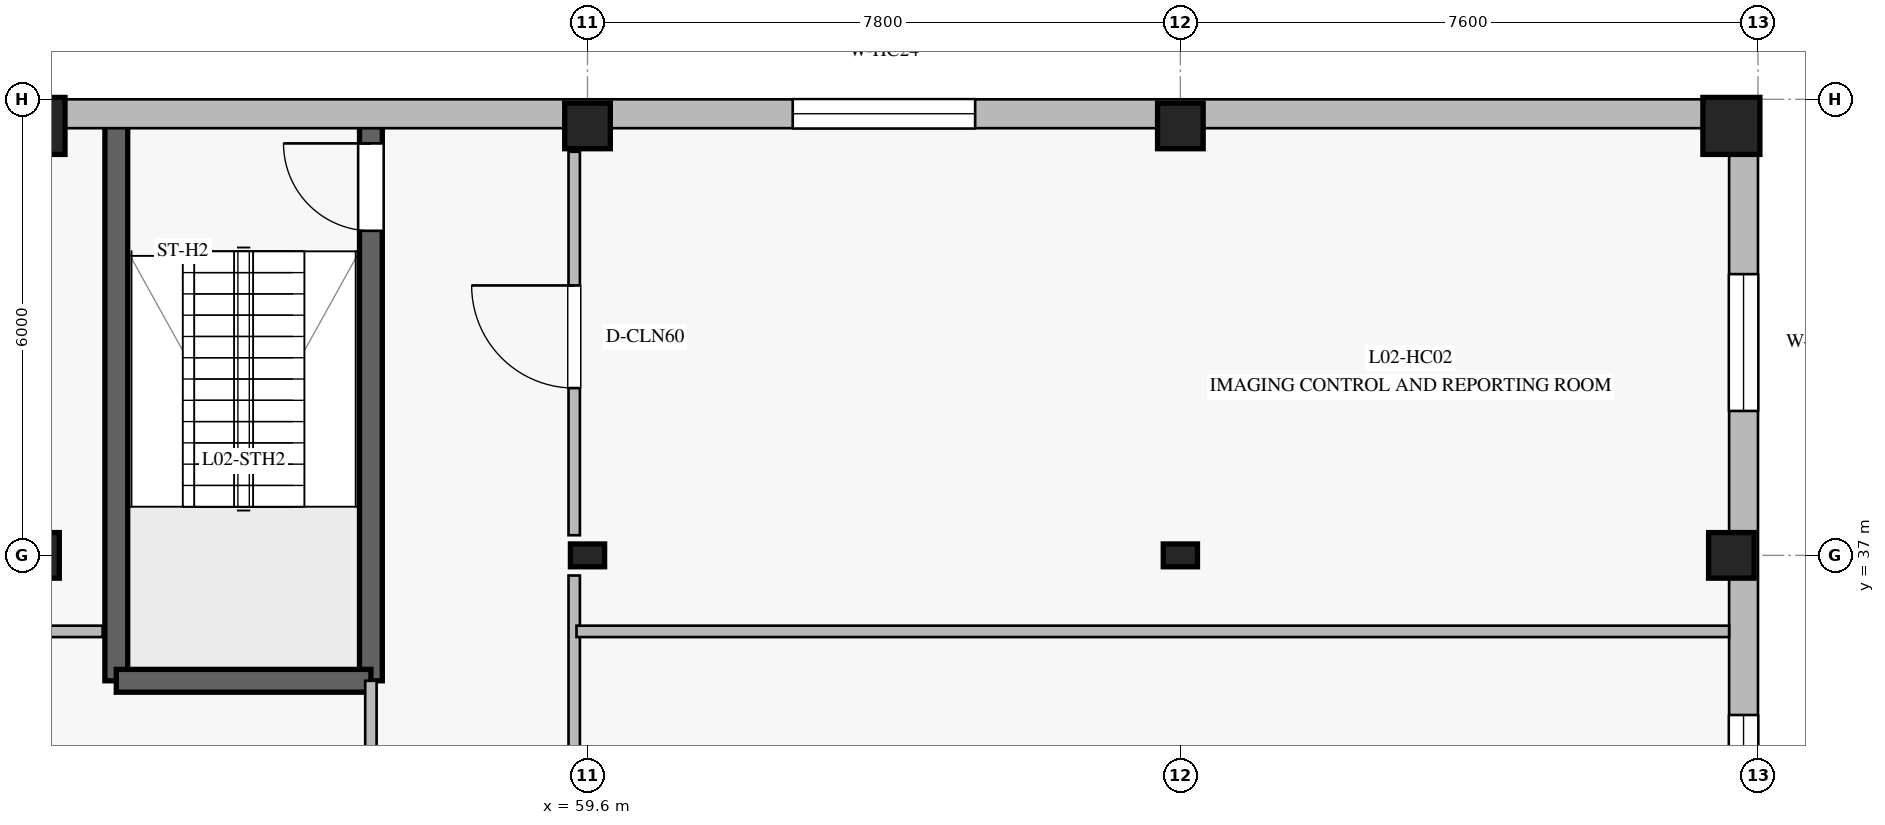
"""IFC4 building model, lengths in metres.
Left out: names, types, materials, properties, quantities, classifications, styles, units other than length and angle.
Written with IfcOpenShell. Run it as: python <this file> out.ifc"""

import sys

from ifc_helpers import new_model, si_unit, direction, frame, frame_2d, origin, origin_2d, place, context, subcontext, project, spatial, rectangle, i_section, extrude, element, fill, save


model = new_model("IFC4")
c1 = context("Model", 3, precision=1e-05, world=origin(), true_north=direction((0.0, 1.0)))
c2 = subcontext(c1, "Body", "Model", "MODEL_VIEW")
j1 = project(units=[si_unit("LENGTHUNIT", "METRE"), si_unit("PLANEANGLEUNIT", "RADIAN")], contexts=[c1])
p1 = place(None, origin())
s1 = spatial("IfcSite", under=j1, at=p1, CompositionType="ELEMENT")
p2 = place(p1, origin())
s2 = spatial("IfcBuilding", under=s1, at=p2, CompositionType="ELEMENT")
p3 = place(p2, frame((0.0, 0.0, 9.8)))
s3 = spatial("IfcBuildingStorey", under=s2, at=p3, CompositionType="ELEMENT", Elevation=9.8)
p4 = place(p3, frame((56.75, 35.35, 0.0), z_axis=(0.0, 0.0, 1.0), x_axis=(0.0, 1.0, 0.0)))
e1 = element("IfcWall", 1, at=p4, inside=s3, PredefinedType="SOLIDWALL", context=c2, shape_type="SweptSolid", body=[
    extrude(rectangle(XDim=7.3, YDim=0.3, at=frame_2d((3.65, 0.0))), origin(), (0.0, 0.0, 1.0), 4.34),
])
p5 = place(p4, frame((5.92, 0.0, 0.0)))
e2 = element("IfcOpeningElement", 2, at=p5, cuts=e1, PredefinedType="OPENING", context=c2, shape_type="SweptSolid", body=[
    extrude(rectangle(XDim=1.15, YDim=2.2, at=frame_2d((0.575, 1.1))), frame((0.0, 0.16, 0.0), z_axis=(0.0, -1.0, 0.0), x_axis=(1.0, 0.0, 0.0)), (0.0, 0.0, 1.0), 0.32),
])
p6 = place(p3, frame((53.4, 35.35, 0.0), z_axis=(0.0, 0.0, 1.0), x_axis=(0.0, 1.0, 0.0)))
e3 = element("IfcWall", 3, at=p6, inside=s3, PredefinedType="SOLIDWALL", context=c2, shape_type="SweptSolid", body=[
    extrude(rectangle(XDim=7.3, YDim=0.3, at=frame_2d((3.65, 0.0))), origin(), (0.0, 0.0, 1.0), 4.34),
])
p7 = place(p3, frame((53.4, 35.35, 0.0), z_axis=(0.0, 0.0, 1.0), x_axis=(1.0, 0.0, 0.0)))
e4 = element("IfcWall", 4, at=p7, inside=s3, PredefinedType="SOLIDWALL", context=c2, shape_type="SweptSolid", body=[
    extrude(rectangle(XDim=3.35, YDim=0.3, at=frame_2d((1.675, 0.0))), origin(), (0.0, 0.0, 1.0), 4.34),
])
p8 = place(p3, frame((52.35, 37.0, 0.0), z_axis=(0.0, 0.0, 1.0), x_axis=(1.0, 0.0, 0.0)))
e5 = element("IfcColumn", 5, at=p8, inside=s3, PredefinedType="COLUMN", context=c2, shape_type="SweptSolid", body=[
    extrude(rectangle(XDim=0.6, YDim=0.6, at=origin_2d()), origin(), (0.0, 0.0, 1.0), 4.6),
])
p9 = place(p3, frame((52.35, 42.65, 0.0), z_axis=(0.0, 0.0, 1.0), x_axis=(1.0, 0.0, 0.0)))
e6 = element("IfcColumn", 6, at=p9, inside=s3, PredefinedType="COLUMN", context=c2, shape_type="SweptSolid", body=[
    extrude(rectangle(XDim=0.75, YDim=0.75, at=origin_2d()), origin(), (0.0, 0.0, 1.0), 4.6),
])
p10 = place(p3, frame((59.6, 37.0, 0.0), z_axis=(0.0, 0.0, 1.0), x_axis=(1.0, 0.0, 0.0)))
e7 = element("IfcColumn", 7, at=p10, inside=s3, PredefinedType="COLUMN", context=c2, shape_type="SweptSolid", body=[
    extrude(i_section(OverallWidth=0.3, OverallDepth=0.45, WebThickness=0.014, FlangeThickness=0.026, at=origin_2d()), origin(), (0.0, 0.0, 1.0), 4.6),
])
p11 = place(p3, frame((59.6, 42.65, 0.0), z_axis=(0.0, 0.0, 1.0), x_axis=(1.0, 0.0, 0.0)))
e8 = element("IfcColumn", 8, at=p11, inside=s3, PredefinedType="COLUMN", context=c2, shape_type="SweptSolid", body=[
    extrude(rectangle(XDim=0.6, YDim=0.6, at=origin_2d()), origin(), (0.0, 0.0, 1.0), 4.6),
])
p12 = place(p3, frame((67.4, 37.0, 0.0), z_axis=(0.0, 0.0, 1.0), x_axis=(1.0, 0.0, 0.0)))
e9 = element("IfcColumn", 9, at=p12, inside=s3, PredefinedType="COLUMN", context=c2, shape_type="SweptSolid", body=[
    extrude(i_section(OverallWidth=0.3, OverallDepth=0.45, WebThickness=0.014, FlangeThickness=0.026, at=origin_2d()), origin(), (0.0, 0.0, 1.0), 4.6),
])
for number, where, z_axis, x_axis in (
    (10, (67.4, 42.65, 0.0), (0.0, 0.0, 1.0), (1.0, 0.0, 0.0)),
    (11, (74.65, 37.0, 0.0), (0.0, 0.0, 1.0), (1.0, 0.0, 0.0)),
):
    element("IfcColumn", number, at=place(p3, frame(where, z_axis=z_axis, x_axis=x_axis)), inside=s3, PredefinedType="COLUMN", context=c2, shape_type="SweptSolid", body=[
        extrude(rectangle(XDim=0.6, YDim=0.6, at=origin_2d()), origin(), (0.0, 0.0, 1.0), 4.6),
    ])
p13 = place(p3, frame((74.65, 42.65, 0.0), z_axis=(0.0, 0.0, 1.0), x_axis=(1.0, 0.0, 0.0)))
e12 = element("IfcColumn", 12, at=p13, inside=s3, PredefinedType="COLUMN", context=c2, shape_type="SweptSolid", body=[
    extrude(rectangle(XDim=0.75, YDim=0.75, at=origin_2d()), origin(), (0.0, 0.0, 1.0), 4.6),
])
p14 = place(p3, frame((52.0, 42.81, 0.0), z_axis=(0.0, 0.0, 1.0), x_axis=(1.0, 0.0, 0.0)))
e13 = element("IfcWall", 13, at=p14, inside=s3, PredefinedType="STANDARD", context=c2, shape_type="SweptSolid", body=[
    extrude(rectangle(XDim=23.0, YDim=0.38, at=frame_2d((11.5, 0.0))), origin(), (0.0, 0.0, 1.0), 4.34),
])
p15 = place(p14, frame((10.3, 0.0, 0.95)))
e14 = element("IfcOpeningElement", 14, at=p15, cuts=e13, PredefinedType="OPENING", context=c2, shape_type="SweptSolid", body=[
    extrude(rectangle(XDim=2.4, YDim=1.8, at=frame_2d((1.2, 0.9))), frame((0.0, 0.2, 0.0), z_axis=(0.0, -1.0, 0.0), x_axis=(1.0, 0.0, 0.0)), (0.0, 0.0, 1.0), 0.4),
])
p16 = place(p3, frame((74.81, 42.62, 0.0), z_axis=(0.0, 0.0, 1.0), x_axis=(0.0, -1.0, 0.0)))
e15 = element("IfcWall", 15, at=p16, inside=s3, PredefinedType="STANDARD", context=c2, shape_type="SweptSolid", body=[
    extrude(rectangle(XDim=35.24, YDim=0.38, at=frame_2d((17.62, 0.0))), origin(), (0.0, 0.0, 1.0), 4.34),
])
p17 = place(p16, frame((31.52, 0.0, 0.9)))
e16 = element("IfcOpeningElement", 16, at=p17, cuts=e15, PredefinedType="OPENING", context=c2, shape_type="SweptSolid", body=[
    extrude(rectangle(XDim=1.8, YDim=1.8, at=frame_2d((0.9, 0.9))), frame((0.0, 0.2, 0.0), z_axis=(0.0, -1.0, 0.0), x_axis=(1.0, 0.0, 0.0)), (0.0, 0.0, 1.0), 0.4),
])
p18 = place(p16, frame((25.72, 0.0, 0.9)))
e17 = element("IfcOpeningElement", 17, at=p18, cuts=e15, PredefinedType="OPENING", context=c2, shape_type="SweptSolid", body=[
    extrude(rectangle(XDim=1.8, YDim=1.8, at=frame_2d((0.9, 0.9))), frame((0.0, 0.2, 0.0), z_axis=(0.0, -1.0, 0.0), x_axis=(1.0, 0.0, 0.0)), (0.0, 0.0, 1.0), 0.4),
])
p19 = place(p16, frame((19.72, 0.0, 0.9)))
e18 = element("IfcOpeningElement", 18, at=p19, cuts=e15, PredefinedType="OPENING", context=c2, shape_type="SweptSolid", body=[
    extrude(rectangle(XDim=1.5, YDim=1.5, at=frame_2d((0.75, 0.75))), frame((0.0, 0.2, 0.0), z_axis=(0.0, -1.0, 0.0), x_axis=(1.0, 0.0, 0.0)), (0.0, 0.0, 1.0), 0.4),
])
p20 = place(p16, frame((13.72, 0.0, 0.9)))
e19 = element("IfcOpeningElement", 19, at=p20, cuts=e15, PredefinedType="OPENING", context=c2, shape_type="SweptSolid", body=[
    extrude(rectangle(XDim=1.5, YDim=1.5, at=frame_2d((0.75, 0.75))), frame((0.0, 0.2, 0.0), z_axis=(0.0, -1.0, 0.0), x_axis=(1.0, 0.0, 0.0)), (0.0, 0.0, 1.0), 0.4),
])
p21 = place(p16, frame((7.72, 0.0, 0.9)))
e20 = element("IfcOpeningElement", 20, at=p21, cuts=e15, PredefinedType="OPENING", context=c2, shape_type="SweptSolid", body=[
    extrude(rectangle(XDim=1.8, YDim=1.8, at=frame_2d((0.9, 0.9))), frame((0.0, 0.2, 0.0), z_axis=(0.0, -1.0, 0.0), x_axis=(1.0, 0.0, 0.0)), (0.0, 0.0, 1.0), 0.4),
])
p22 = place(p16, frame((1.92, 0.0, 0.9)))
e21 = element("IfcOpeningElement", 21, at=p22, cuts=e15, PredefinedType="OPENING", context=c2, shape_type="SweptSolid", body=[
    extrude(rectangle(XDim=1.8, YDim=1.8, at=frame_2d((0.9, 0.9))), frame((0.0, 0.2, 0.0), z_axis=(0.0, -1.0, 0.0), x_axis=(1.0, 0.0, 0.0)), (0.0, 0.0, 1.0), 0.4),
])
p23 = place(p3, frame((56.75, 14.65, 0.0), z_axis=(0.0, 0.0, 1.0), x_axis=(0.0, 1.0, 0.0)))
e22 = element("IfcWall", 22, at=p23, inside=s3, PredefinedType="PARTITIONING", context=c2, shape_type="SweptSolid", body=[
    extrude(rectangle(XDim=20.7, YDim=0.15, at=frame_2d((10.35, 0.0))), origin(), (0.0, 0.0, 1.0), 4.34),
])
p24 = place(p23, frame((9.675, 0.0, 0.0)))
e23 = element("IfcOpeningElement", 23, at=p24, cuts=e22, PredefinedType="OPENING", context=c2, shape_type="SweptSolid", body=[
    extrude(rectangle(XDim=1.35, YDim=2.2, at=frame_2d((0.675, 1.1))), frame((0.0, 0.085, 0.0), z_axis=(0.0, -1.0, 0.0), x_axis=(1.0, 0.0, 0.0)), (0.0, 0.0, 1.0), 0.17),
])
p25 = place(p3, frame((59.425, 31.265, 0.0), z_axis=(0.0, 0.0, 1.0), x_axis=(0.0, 1.0, 0.0)))
e24 = element("IfcWall", 24, at=p25, inside=s3, PredefinedType="PARTITIONING", context=c2, shape_type="SweptSolid", body=[
    extrude(rectangle(XDim=5.47, YDim=0.15, at=frame_2d((2.735, 0.0))), origin(), (0.0, 0.0, 1.0), 3.98),
])
p26 = place(p3, frame((59.425, 37.265, 0.0), z_axis=(0.0, 0.0, 1.0), x_axis=(0.0, 1.0, 0.0)))
e25 = element("IfcWall", 25, at=p26, inside=s3, PredefinedType="PARTITIONING", context=c2, shape_type="SweptSolid", body=[
    extrude(rectangle(XDim=5.045, YDim=0.15, at=frame_2d((2.522, 0.0))), origin(), (0.0, 0.0, 1.0), 3.98),
])
p27 = place(p26, frame((1.936, 0.0, 0.0)))
e26 = element("IfcOpeningElement", 26, at=p27, cuts=e25, PredefinedType="OPENING", context=c2, shape_type="SweptSolid", body=[
    extrude(rectangle(XDim=1.35, YDim=2.2, at=frame_2d((0.675, 1.1))), frame((0.0, 0.085, 0.0), z_axis=(0.0, -1.0, 0.0), x_axis=(1.0, 0.0, 0.0)), (0.0, 0.0, 1.0), 0.17),
])
p28 = place(p3, frame((52.38, 36.0, 0.0), z_axis=(0.0, 0.0, 1.0), x_axis=(1.0, 0.0, 0.0)))
e27 = element("IfcWall", 27, at=p28, inside=s3, PredefinedType="PARTITIONING", context=c2, shape_type="SweptSolid", body=[
    extrude(rectangle(XDim=0.84, YDim=0.15, at=frame_2d((0.42, 0.0))), origin(), (0.0, 0.0, 1.0), 3.98),
])
p29 = place(p3, frame((59.455, 36.0, 0.0), z_axis=(0.0, 0.0, 1.0), x_axis=(1.0, 0.0, 0.0)))
e28 = element("IfcWall", 28, at=p29, inside=s3, PredefinedType="PARTITIONING", context=c2, shape_type="SweptSolid", body=[
    extrude(rectangle(XDim=15.165, YDim=0.15, at=frame_2d((7.583, 0.0))), origin(), (0.0, 0.0, 1.0), 3.98),
])
p30 = place(p21, origin())
e29 = element("IfcWindow", 29, at=p30, inside=s3, PartitioningType="DOUBLE_PANEL_VERTICAL", PredefinedType="WINDOW", context=c2, shape_type="SweptSolid", body=[
    extrude(rectangle(XDim=1.8, YDim=1.8, at=frame_2d((0.9, 0.9))), frame((0.0, 0.03, 0.0), z_axis=(0.0, -1.0, 0.0), x_axis=(1.0, 0.0, 0.0)), (0.0, 0.0, 1.0), 0.06),
])
fill(e20, e29)
p31 = place(p22, origin())
e30 = element("IfcWindow", 30, at=p31, inside=s3, PartitioningType="DOUBLE_PANEL_VERTICAL", PredefinedType="WINDOW", context=c2, shape_type="SweptSolid", body=[
    extrude(rectangle(XDim=1.8, YDim=1.8, at=frame_2d((0.9, 0.9))), frame((0.0, 0.03, 0.0), z_axis=(0.0, -1.0, 0.0), x_axis=(1.0, 0.0, 0.0)), (0.0, 0.0, 1.0), 0.06),
])
fill(e21, e30)
p32 = place(p15, origin())
e31 = element("IfcWindow", 31, at=p32, inside=s3, PartitioningType="TRIPLE_PANEL_VERTICAL", PredefinedType="WINDOW", context=c2, shape_type="SweptSolid", body=[
    extrude(rectangle(XDim=2.4, YDim=1.8, at=frame_2d((1.2, 0.9))), frame((0.0, 0.03, 0.0), z_axis=(0.0, -1.0, 0.0), x_axis=(1.0, 0.0, 0.0)), (0.0, 0.0, 1.0), 0.06),
])
fill(e14, e31)
p33 = place(p5, origin())
e32 = element("IfcDoor", 32, at=p33, inside=s3, OperationType="SINGLE_SWING_RIGHT", PredefinedType="DOOR", context=c2, shape_type="SweptSolid", body=[
    extrude(rectangle(XDim=1.15, YDim=2.2, at=frame_2d((0.575, 1.1))), frame((0.0, 0.025, 0.0), z_axis=(0.0, -1.0, 0.0), x_axis=(1.0, 0.0, 0.0)), (0.0, 0.0, 1.0), 0.05),
])
fill(e2, e32)
p34 = place(p27, origin())
e33 = element("IfcDoor", 33, at=p34, inside=s3, OperationType="SINGLE_SWING_RIGHT", PredefinedType="DOOR", context=c2, shape_type="SweptSolid", body=[
    extrude(rectangle(XDim=1.35, YDim=2.2, at=frame_2d((0.675, 1.1))), frame((0.0, 0.025, 0.0), z_axis=(0.0, -1.0, 0.0), x_axis=(1.0, 0.0, 0.0)), (0.0, 0.0, 1.0), 0.05),
])
fill(e26, e33)
save(model, sys.argv[1])
